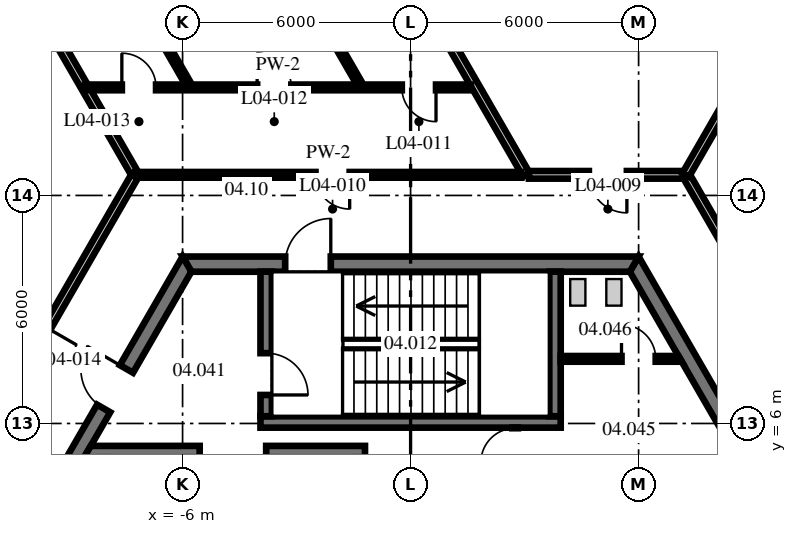
"""IFC4 building model, lengths in metres.
Left out: names, types, materials, properties, quantities, classifications, styles, units other than length and angle.
Written with IfcOpenShell. Run it as: python <this file> out.ifc"""

import sys

from ifc_helpers import new_model, si_unit, direction, frame, frame_2d, origin, place, context, subcontext, project, spatial, polyline, rectangle, outline, extrude, source, transform, mapped, element, fill, save


model = new_model("IFC4")
c1 = context("Model", 3, precision=1e-05, world=origin(), true_north=direction((0.0, 1.0)))
c2 = subcontext(c1, "Body", "Model", "MODEL_VIEW")
j1 = project(units=[si_unit("LENGTHUNIT", "METRE"), si_unit("PLANEANGLEUNIT", "RADIAN")], contexts=[c1])
p1 = place(None, origin())
s1 = spatial("IfcSite", under=j1, at=p1, CompositionType="ELEMENT")
p2 = place(p1, origin())
s2 = spatial("IfcBuilding", under=s1, at=p2, CompositionType="ELEMENT")
p3 = place(p2, frame((0.0, 0.0, 20.3)))
s3 = spatial("IfcBuildingStorey", under=s2, at=p3, CompositionType="ELEMENT", Elevation=20.3)
m1 = source(origin(), c2, "Body", "SweptSolid", [
    extrude(outline(polyline([(-0.115, -0.2), (11.885, -0.2), (11.654, 0.2), (0.115, 0.2), (-0.115, -0.2)])), origin(), (0.0, 0.0, 1.0), 4.1),
])
p4 = place(p3, frame((11.769, 0.0, 0.0), z_axis=(0.0, 0.0, 1.0), x_axis=(-0.499996592174, 0.866027371285, 0.0)))
e1 = element("IfcWall", 1, at=p4, inside=s3, PredefinedType="SHEAR", context=c2, shape_type="MappedRepresentation", body=[
    mapped(m1, transform((0.0, 0.0, 0.0), scale=1.0)),
])
p5 = place(p4, frame((5.75, 0.0, 0.0)))
e2 = element("IfcOpeningElement", 2, at=p5, cuts=e1, PredefinedType="OPENING", context=c2, shape_type="SweptSolid", body=[
    extrude(rectangle(XDim=1.2, YDim=2.1, at=frame_2d((0.6, 1.05))), frame((0.0, 0.21, 0.0), z_axis=(0.0, -1.0, 0.0), x_axis=(1.0, 0.0, 0.0)), (0.0, 0.0, 1.0), 0.42),
])
p6 = place(p3, frame((5.885, 10.192, 0.0), z_axis=(0.0, 0.0, 1.0), x_axis=(-1.0, 0.0, 0.0)))
e3 = element("IfcWall", 3, at=p6, inside=s3, PredefinedType="SHEAR", context=c2, shape_type="MappedRepresentation", body=[
    mapped(m1, transform((0.0, 0.0, 0.0), scale=1.0)),
])
p7 = place(p6, frame((7.985, 0.0, 0.0)))
e4 = element("IfcOpeningElement", 4, at=p7, cuts=e3, PredefinedType="OPENING", context=c2, shape_type="SweptSolid", body=[
    extrude(rectangle(XDim=1.2, YDim=2.1, at=frame_2d((0.6, 1.05))), frame((0.0, 0.21, 0.0), z_axis=(0.0, -1.0, 0.0), x_axis=(1.0, 0.0, 0.0)), (0.0, 0.0, 1.0), 0.42),
])
p8 = place(p3, frame((-5.885, 10.192, 0.0), z_axis=(0.0, 0.0, 1.0), x_axis=(-0.499996592174, -0.866027371285, 0.0)))
e5 = element("IfcWall", 5, at=p8, inside=s3, PredefinedType="SHEAR", context=c2, shape_type="MappedRepresentation", body=[
    mapped(m1, transform((0.0, 0.0, 0.0), scale=1.0)),
])
p9 = place(p8, frame((3.185, 0.0, 0.0)))
e6 = element("IfcOpeningElement", 6, at=p9, cuts=e5, PredefinedType="OPENING", context=c2, shape_type="SweptSolid", body=[
    extrude(rectangle(XDim=1.2, YDim=2.1, at=frame_2d((0.6, 1.05))), frame((0.0, 0.21, 0.0), z_axis=(0.0, -1.0, 0.0), x_axis=(1.0, 0.0, 0.0)), (0.0, 0.0, 1.0), 0.42),
])
m2 = source(origin(), c2, "Body", "SweptSolid", [
    extrude(rectangle(XDim=7.9, YDim=0.3, at=frame_2d((3.95, 0.0))), origin(), (0.0, 0.0, 1.0), 4.1),
])
p10 = place(p3, frame((-3.95, 6.04, 0.0), z_axis=(0.0, 0.0, 1.0), x_axis=(1.0, 0.0, 0.0)))
e7 = element("IfcWall", 7, at=p10, inside=s3, PredefinedType="SHEAR", context=c2, shape_type="MappedRepresentation", body=[
    mapped(m2, transform((0.0, 0.0, 0.0), scale=1.0)),
])
m3 = source(origin(), c2, "Body", "SweptSolid", [
    extrude(outline(polyline([(0.0, -0.15), (0.0, 0.15), (3.804, 0.15), (3.804, -0.15), (0.0, -0.15)])), origin(), (0.0, 0.0, 1.0), 4.1),
])
p11 = place(p3, frame((-3.8, 6.19, 0.0), z_axis=(0.0, 0.0, 1.0), x_axis=(0.0, 1.0, 0.0)))
e8 = element("IfcWall", 8, at=p11, inside=s3, PredefinedType="SHEAR", context=c2, shape_type="MappedRepresentation", body=[
    mapped(m3, transform((0.0, 0.0, 0.0), scale=1.0)),
])
p12 = place(p11, frame((0.56, 0.0, 0.0)))
e9 = element("IfcOpeningElement", 9, at=p12, cuts=e8, PredefinedType="OPENING", context=c2, shape_type="SweptSolid", body=[
    extrude(rectangle(XDim=1.1, YDim=2.1, at=frame_2d((0.55, 1.05))), frame((0.0, 0.16, 0.0), z_axis=(0.0, -1.0, 0.0), x_axis=(1.0, 0.0, 0.0)), (0.0, 0.0, 1.0), 0.32),
])
p13 = place(p3, frame((3.8, 6.19, 0.0), z_axis=(0.0, 0.0, 1.0), x_axis=(0.0, 1.0, 0.0)))
e10 = element("IfcWall", 10, at=p13, inside=s3, PredefinedType="SHEAR", context=c2, shape_type="MappedRepresentation", body=[
    mapped(m3, transform((0.0, 0.0, 0.0), scale=1.0)),
])
m4 = source(origin(), c2, "Body", "SweptSolid", [
    extrude(outline(polyline([(2.6, -0.15), (-0.44, -0.15), (-0.267, 0.15), (2.6, 0.15), (2.6, -0.15)])), origin(), (0.0, 0.0, 1.0), 4.1),
])
p14 = place(p3, frame((-8.15, 5.26, 0.0), z_axis=(0.0, 0.0, 1.0), x_axis=(1.0, 0.0, 0.0)))
e11 = element("IfcWall", 11, at=p14, inside=s3, PredefinedType="SHEAR", context=c2, shape_type="MappedRepresentation", body=[
    mapped(m4, transform((0.0, 0.0, 0.0), scale=1.0)),
])
m5 = source(origin(), c2, "Body", "SweptSolid", [
    extrude(rectangle(XDim=2.6, YDim=0.3, at=frame_2d((1.3, 0.0))), origin(), (0.0, 0.0, 1.0), 4.1),
])
p15 = place(p3, frame((-3.8, 5.26, 0.0), z_axis=(0.0, 0.0, 1.0), x_axis=(1.0, 0.0, 0.0)))
e12 = element("IfcWall", 12, at=p15, inside=s3, PredefinedType="SHEAR", context=c2, shape_type="MappedRepresentation", body=[
    mapped(m5, transform((0.0, 0.0, 0.0), scale=1.0)),
])
m6 = source(origin(), c2, "Body", "SweptSolid", [
    extrude(outline(polyline([(0.0, -0.075), (0.0, 0.075), (3.102, 0.075), (3.188, -0.075), (0.0, -0.075)])), origin(), (0.0, 0.0, 1.0), 4.1),
])
p16 = place(p3, frame((3.95, 7.7, 0.0), z_axis=(0.0, 0.0, 1.0), x_axis=(1.0, 0.0, 0.0)))
e13 = element("IfcWall", 13, at=p16, inside=s3, PredefinedType="PARTITIONING", context=c2, shape_type="MappedRepresentation", body=[
    mapped(m6, transform((0.0, 0.0, 0.0), scale=1.0)),
])
p17 = place(p16, frame((1.6, 0.0, 0.0)))
e14 = element("IfcOpeningElement", 14, at=p17, cuts=e13, PredefinedType="OPENING", context=c2, shape_type="SweptSolid", body=[
    extrude(rectangle(XDim=0.9, YDim=2.1, at=frame_2d((0.45, 1.05))), frame((0.0, 0.085, 0.0), z_axis=(0.0, -1.0, 0.0), x_axis=(1.0, 0.0, 0.0)), (0.0, 0.0, 1.0), 0.17),
])
m7 = source(origin(), c2, "Body", "SweptSolid", [
    extrude(rectangle(XDim=0.93, YDim=0.15, at=frame_2d((0.465, 0.0))), origin(), (0.0, 0.0, 1.0), 4.1),
])
p18 = place(p3, frame((2.75, 4.96, 0.0), z_axis=(0.0, 0.0, 1.0), x_axis=(0.0, 1.0, 0.0)))
e15 = element("IfcWall", 15, at=p18, inside=s3, PredefinedType="PARTITIONING", context=c2, shape_type="MappedRepresentation", body=[
    mapped(m7, transform((0.0, 0.0, 0.0), scale=1.0)),
])
p19 = place(p18, frame((0.015, 0.0, 0.0)))
e16 = element("IfcOpeningElement", 16, at=p19, cuts=e15, PredefinedType="OPENING", context=c2, shape_type="SweptSolid", body=[
    extrude(rectangle(XDim=0.9, YDim=2.1, at=frame_2d((0.45, 1.05))), frame((0.0, 0.085, 0.0), z_axis=(0.0, -1.0, 0.0), x_axis=(1.0, 0.0, 0.0)), (0.0, 0.0, 1.0), 0.17),
])
m8 = source(origin(), c2, "Body", "SweptSolid", [
    extrude(rectangle(XDim=6.934, YDim=0.2, at=frame_2d((3.467, 0.0))), origin(), (0.0, 0.0, 1.0), 3.488),
])
p20 = place(p3, frame((-10.743, 18.608, 0.0), z_axis=(0.0, 0.0, 1.0), x_axis=(0.499986605379, -0.866033137035, 0.0)))
e17 = element("IfcWall", 17, at=p20, inside=s3, PredefinedType="PARTITIONING", context=c2, shape_type="MappedRepresentation", body=[
    mapped(m8, transform((0.0, 0.0, 0.0), scale=1.0)),
])
m9 = source(origin(), c2, "Body", "SweptSolid", [
    extrude(rectangle(XDim=7.509, YDim=0.15, at=frame_2d((3.754, 0.0))), origin(), (0.0, 0.0, 1.0), 4.1),
])
p21 = place(p3, frame((-9.607, 21.44, 0.0), z_axis=(0.0, 0.0, 1.0), x_axis=(0.500006720231, -0.866021523823, 0.0)))
e18 = element("IfcWall", 18, at=p21, inside=s3, PredefinedType="PARTITIONING", context=c2, shape_type="MappedRepresentation", body=[
    mapped(m9, transform((0.0, 0.0, 0.0), scale=1.0)),
])
m10 = source(origin(), c2, "Body", "SweptSolid", [
    extrude(rectangle(XDim=9.764, YDim=0.15, at=frame_2d((4.882, 0.0))), origin(), (0.0, 0.0, 1.0), 4.1),
])
p22 = place(p3, frame((-6.225, 23.393, 0.0), z_axis=(0.0, 0.0, 1.0), x_axis=(0.499990124937, -0.86603110508, 0.0)))
e19 = element("IfcWall", 19, at=p22, inside=s3, PredefinedType="PARTITIONING", context=c2, shape_type="MappedRepresentation", body=[
    mapped(m10, transform((0.0, 0.0, 0.0), scale=1.0)),
])
m11 = source(origin(), c2, "Body", "SweptSolid", [
    extrude(rectangle(XDim=12.148, YDim=0.2, at=frame_2d((6.074, 0.0))), origin(), (0.0, 0.0, 1.0), 3.343),
])
p23 = place(p3, frame((-3.027, 23.063, 0.0), z_axis=(0.0, 0.0, 1.0), x_axis=(0.499997320042, -0.866026951053, 0.0)))
e20 = element("IfcWall", 20, at=p23, inside=s3, PredefinedType="PARTITIONING", context=c2, shape_type="MappedRepresentation", body=[
    mapped(m11, transform((0.0, 0.0, 0.0), scale=1.0)),
])
m12 = source(origin(), c2, "Body", "SweptSolid", [
    extrude(rectangle(XDim=3.885, YDim=0.2, at=frame_2d((1.942, 0.0))), origin(), (0.0, 0.0, 1.0), 4.1),
])
p24 = place(p3, frame((7.276, 12.482, 0.0), z_axis=(0.0, 0.0, 1.0), x_axis=(0.499978127697, -0.866038031396, 0.0)))
e21 = element("IfcWall", 21, at=p24, inside=s3, PredefinedType="PARTITIONING", context=c2, shape_type="MappedRepresentation", body=[
    mapped(m12, transform((0.0, 0.0, 0.0), scale=1.0)),
])
m13 = source(origin(), c2, "Body", "SweptSolid", [
    extrude(rectangle(XDim=10.155, YDim=0.15, at=frame_2d((5.077, 0.0))), origin(), (0.0, 0.0, 1.0), 4.1),
])
p25 = place(p3, frame((-7.241, 12.542, 0.0), z_axis=(0.0, 0.0, 1.0), x_axis=(1.0, 0.0, 0.0)))
e22 = element("IfcWall", 22, at=p25, inside=s3, PredefinedType="PARTITIONING", context=c2, shape_type="MappedRepresentation", body=[
    mapped(m13, transform((0.0, 0.0, 0.0), scale=1.0)),
])
p26 = place(p25, frame((4.738, 0.0, 0.0)))
e23 = element("IfcOpeningElement", 23, at=p26, cuts=e22, PredefinedType="OPENING", context=c2, shape_type="SweptSolid", body=[
    extrude(rectangle(XDim=0.9, YDim=2.1, at=frame_2d((0.45, 1.05))), frame((0.0, 0.085, 0.0), z_axis=(0.0, -1.0, 0.0), x_axis=(1.0, 0.0, 0.0)), (0.0, 0.0, 1.0), 0.17),
])
m14 = source(origin(), c2, "Body", "SweptSolid", [
    extrude(rectangle(XDim=4.058, YDim=0.2, at=frame_2d((2.029, 0.0))), origin(), (0.0, 0.0, 1.0), 4.1),
])
p27 = place(p3, frame((3.114, 12.542, 0.0), z_axis=(0.0, 0.0, 1.0), x_axis=(1.0, 0.0, 0.0)))
e24 = element("IfcWall", 24, at=p27, inside=s3, PredefinedType="PARTITIONING", context=c2, shape_type="MappedRepresentation", body=[
    mapped(m14, transform((0.0, 0.0, 0.0), scale=1.0)),
])
p28 = place(p27, frame((1.578, 0.0, 0.0)))
e25 = element("IfcOpeningElement", 25, at=p28, cuts=e24, PredefinedType="OPENING", context=c2, shape_type="SweptSolid", body=[
    extrude(rectangle(XDim=1.0, YDim=2.1, at=frame_2d((0.5, 1.05))), frame((0.0, 0.11, 0.0), z_axis=(0.0, -1.0, 0.0), x_axis=(1.0, 0.0, 0.0)), (0.0, 0.0, 1.0), 0.22),
])
m15 = source(origin(), c2, "Body", "SweptSolid", [
    extrude(rectangle(XDim=10.158, YDim=0.15, at=frame_2d((5.079, 0.0))), origin(), (0.0, 0.0, 1.0), 4.1),
])
p29 = place(p3, frame((-8.569, 14.842, 0.0), z_axis=(0.0, 0.0, 1.0), x_axis=(1.0, 0.0, 0.0)))
e26 = element("IfcWall", 26, at=p29, inside=s3, PredefinedType="PARTITIONING", context=c2, shape_type="MappedRepresentation", body=[
    mapped(m15, transform((0.0, 0.0, 0.0), scale=1.0)),
])
p30 = place(p29, frame((8.338, 0.0, 0.0)))
e27 = element("IfcOpeningElement", 27, at=p30, cuts=e26, PredefinedType="OPENING", context=c2, shape_type="SweptSolid", body=[
    extrude(rectangle(XDim=0.9, YDim=2.1, at=frame_2d((0.45, 1.05))), frame((0.0, 0.085, 0.0), z_axis=(0.0, -1.0, 0.0), x_axis=(1.0, 0.0, 0.0)), (0.0, 0.0, 1.0), 0.17),
])
p31 = place(p29, frame((4.531, 0.0, 0.0)))
e28 = element("IfcOpeningElement", 28, at=p31, cuts=e26, PredefinedType="OPENING", context=c2, shape_type="SweptSolid", body=[
    extrude(rectangle(XDim=0.9, YDim=2.1, at=frame_2d((0.45, 1.05))), frame((0.0, 0.085, 0.0), z_axis=(0.0, -1.0, 0.0), x_axis=(1.0, 0.0, 0.0)), (0.0, 0.0, 1.0), 0.17),
])
p32 = place(p29, frame((0.971, 0.0, 0.0)))
e29 = element("IfcOpeningElement", 29, at=p32, cuts=e26, PredefinedType="OPENING", context=c2, shape_type="SweptSolid", body=[
    extrude(rectangle(XDim=0.9, YDim=2.1, at=frame_2d((0.45, 1.05))), frame((0.0, 0.085, 0.0), z_axis=(0.0, -1.0, 0.0), x_axis=(1.0, 0.0, 0.0)), (0.0, 0.0, 1.0), 0.17),
])
m16 = source(origin(), c2, "Body", "SweptSolid", [
    extrude(rectangle(XDim=10.136, YDim=0.2, at=frame_2d((5.068, 0.0))), origin(), (0.0, 0.0, 1.0), 4.1),
])
p33 = place(p3, frame((7.241, 12.542, 0.0), z_axis=(0.0, 0.0, 1.0), x_axis=(0.49999906822, 0.866025941747, 0.0)))
e30 = element("IfcWall", 30, at=p33, inside=s3, PredefinedType="PARTITIONING", context=c2, shape_type="MappedRepresentation", body=[
    mapped(m16, transform((0.0, 0.0, 0.0), scale=1.0)),
])
m17 = source(origin(), c2, "Body", "SweptSolid", [
    extrude(rectangle(XDim=10.082, YDim=0.2, at=frame_2d((5.041, 0.0))), origin(), (0.0, 0.0, 1.0), 4.1),
])
p34 = place(p3, frame((-12.307, 3.768, 0.0), z_axis=(0.0, 0.0, 1.0), x_axis=(0.500014523669, 0.866017018378, 0.0)))
e31 = element("IfcWall", 31, at=p34, inside=s3, PredefinedType="PARTITIONING", context=c2, shape_type="MappedRepresentation", body=[
    mapped(m17, transform((0.0, 0.0, 0.0), scale=1.0)),
])
p35 = place(p34, frame((4.582, 0.0, 0.0)))
e32 = element("IfcOpeningElement", 32, at=p35, cuts=e31, PredefinedType="OPENING", context=c2, shape_type="SweptSolid", body=[
    extrude(rectangle(XDim=0.9, YDim=2.1, at=frame_2d((0.45, 1.05))), frame((0.0, 0.11, 0.0), z_axis=(0.0, -1.0, 0.0), x_axis=(1.0, 0.0, 0.0)), (0.0, 0.0, 1.0), 0.22),
])
p36 = place(p7, frame((1.2, 0.0, 0.0), z_axis=(0.0, 0.0, 1.0), x_axis=(-1.0, 0.0, 0.0)))
e33 = element("IfcDoor", 33, at=p36, inside=s3, OperationType="SINGLE_SWING_RIGHT", PredefinedType="DOOR", context=c2, shape_type="SweptSolid", body=[
    extrude(rectangle(XDim=1.2, YDim=2.1, at=frame_2d((0.6, 1.05))), frame((0.0, 0.025, 0.0), z_axis=(0.0, -1.0, 0.0), x_axis=(1.0, 0.0, 0.0)), (0.0, 0.0, 1.0), 0.05),
])
fill(e4, e33)
p37 = place(p9, frame((1.2, 0.0, 0.0), z_axis=(0.0, 0.0, 1.0), x_axis=(-1.0, 0.0, 0.0)))
e34 = element("IfcDoor", 34, at=p37, inside=s3, OperationType="SINGLE_SWING_RIGHT", PredefinedType="DOOR", context=c2, shape_type="SweptSolid", body=[
    extrude(rectangle(XDim=1.2, YDim=2.1, at=frame_2d((0.6, 1.05))), frame((0.0, 0.025, 0.0), z_axis=(0.0, -1.0, 0.0), x_axis=(1.0, 0.0, 0.0)), (0.0, 0.0, 1.0), 0.05),
])
fill(e6, e34)
p38 = place(p12, frame((1.1, 0.0, 0.0), z_axis=(0.0, 0.0, 1.0), x_axis=(-1.0, 0.0, 0.0)))
e35 = element("IfcDoor", 35, at=p38, inside=s3, OperationType="SINGLE_SWING_RIGHT", PredefinedType="DOOR", context=c2, shape_type="SweptSolid", body=[
    extrude(rectangle(XDim=1.1, YDim=2.1, at=frame_2d((0.55, 1.05))), frame((0.0, 0.025, 0.0), z_axis=(0.0, -1.0, 0.0), x_axis=(1.0, 0.0, 0.0)), (0.0, 0.0, 1.0), 0.05),
])
fill(e9, e35)
p39 = place(p19, origin())
e36 = element("IfcDoor", 36, at=p39, inside=s3, OperationType="SINGLE_SWING_LEFT", PredefinedType="DOOR", context=c2, shape_type="SweptSolid", body=[
    extrude(rectangle(XDim=0.9, YDim=2.1, at=frame_2d((0.45, 1.05))), frame((0.0, 0.025, 0.0), z_axis=(0.0, -1.0, 0.0), x_axis=(1.0, 0.0, 0.0)), (0.0, 0.0, 1.0), 0.05),
])
fill(e16, e36)
p40 = place(p17, origin())
e37 = element("IfcDoor", 37, at=p40, inside=s3, OperationType="SINGLE_SWING_LEFT", PredefinedType="DOOR", context=c2, shape_type="SweptSolid", body=[
    extrude(rectangle(XDim=0.9, YDim=2.1, at=frame_2d((0.45, 1.05))), frame((0.0, 0.025, 0.0), z_axis=(0.0, -1.0, 0.0), x_axis=(1.0, 0.0, 0.0)), (0.0, 0.0, 1.0), 0.05),
])
fill(e14, e37)
p41 = place(p28, origin())
e38 = element("IfcDoor", 38, at=p41, inside=s3, OperationType="SINGLE_SWING_RIGHT", PredefinedType="DOOR", context=c2, shape_type="SweptSolid", body=[
    extrude(rectangle(XDim=1.0, YDim=2.1, at=frame_2d((0.5, 1.05))), frame((0.0, 0.025, 0.0), z_axis=(0.0, -1.0, 0.0), x_axis=(1.0, 0.0, 0.0)), (0.0, 0.0, 1.0), 0.05),
])
fill(e25, e38)
p42 = place(p26, origin())
e39 = element("IfcDoor", 39, at=p42, inside=s3, OperationType="SINGLE_SWING_RIGHT", PredefinedType="DOOR", context=c2, shape_type="SweptSolid", body=[
    extrude(rectangle(XDim=0.9, YDim=2.1, at=frame_2d((0.45, 1.05))), frame((0.0, 0.025, 0.0), z_axis=(0.0, -1.0, 0.0), x_axis=(1.0, 0.0, 0.0)), (0.0, 0.0, 1.0), 0.05),
])
fill(e23, e39)
p43 = place(p30, origin())
e40 = element("IfcDoor", 40, at=p43, inside=s3, OperationType="SINGLE_SWING_RIGHT", PredefinedType="DOOR", context=c2, shape_type="SweptSolid", body=[
    extrude(rectangle(XDim=0.9, YDim=2.1, at=frame_2d((0.45, 1.05))), frame((0.0, 0.025, 0.0), z_axis=(0.0, -1.0, 0.0), x_axis=(1.0, 0.0, 0.0)), (0.0, 0.0, 1.0), 0.05),
])
fill(e27, e40)
p44 = place(p31, origin())
e41 = element("IfcDoor", 41, at=p44, inside=s3, OperationType="SINGLE_SWING_LEFT", PredefinedType="DOOR", context=c2, shape_type="SweptSolid", body=[
    extrude(rectangle(XDim=0.9, YDim=2.1, at=frame_2d((0.45, 1.05))), frame((0.0, 0.025, 0.0), z_axis=(0.0, -1.0, 0.0), x_axis=(1.0, 0.0, 0.0)), (0.0, 0.0, 1.0), 0.05),
])
fill(e28, e41)
p45 = place(p32, origin())
e42 = element("IfcDoor", 42, at=p45, inside=s3, OperationType="SINGLE_SWING_LEFT", PredefinedType="DOOR", context=c2, shape_type="SweptSolid", body=[
    extrude(rectangle(XDim=0.9, YDim=2.1, at=frame_2d((0.45, 1.05))), frame((0.0, 0.025, 0.0), z_axis=(0.0, -1.0, 0.0), x_axis=(1.0, 0.0, 0.0)), (0.0, 0.0, 1.0), 0.05),
])
fill(e29, e42)
save(model, sys.argv[1])
